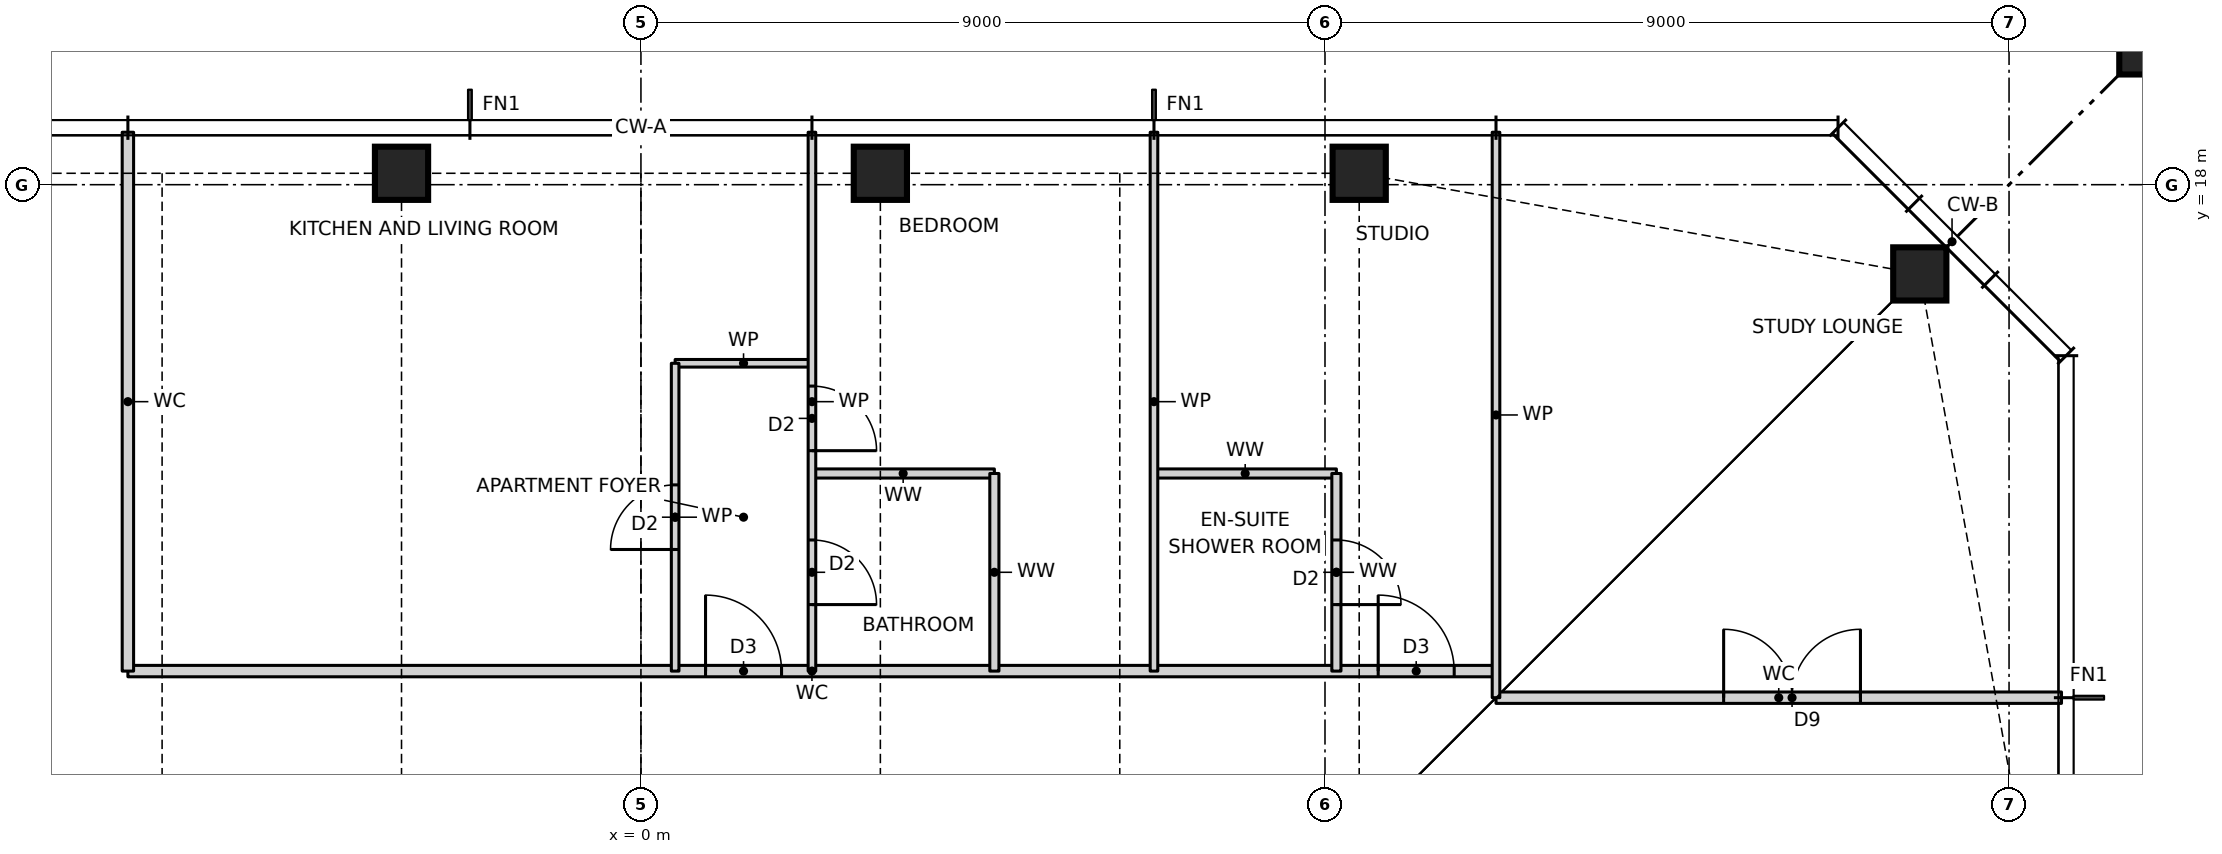
"""IFC4 building model, lengths in metres.
Left out: names, types, materials, properties, quantities, classifications, styles, units other than length and angle.
Written with IfcOpenShell. Run it as: python <this file> out.ifc"""

import sys

from ifc_helpers import new_model, si_unit, direction, frame, frame_2d, origin, origin_2d, place, context, subcontext, project, spatial, rectangle, hollow_rectangle, i_section, extrude, element, fill, save


model = new_model("IFC4")
c1 = context("Model", 3, precision=1e-05, world=origin(), true_north=direction((0.0, 1.0)))
c2 = subcontext(c1, "Body", "Model", "MODEL_VIEW")
j1 = project(units=[si_unit("LENGTHUNIT", "METRE"), si_unit("PLANEANGLEUNIT", "RADIAN")], contexts=[c1])
p1 = place(None, origin())
s1 = spatial("IfcSite", under=j1, at=p1, CompositionType="ELEMENT")
p2 = place(p1, origin())
s2 = spatial("IfcBuilding", under=s1, at=p2, CompositionType="ELEMENT")
p3 = place(p2, frame((0.0, 0.0, 184.5)))
s3 = spatial("IfcBuildingStorey", under=s2, at=p3, CompositionType="ELEMENT", Elevation=184.5)
for number, where, z_axis, x_axis in (
    (1, (16.826, 16.826, 0.0), (0.0, 0.0, 1.0), (1.0, 0.0, 0.0)),
    (2, (9.45, 18.15, 0.0), (0.0, 0.0, 1.0), (1.0, 0.0, 0.0)),
    (3, (3.15, 18.15, 0.0), (0.0, 0.0, 1.0), (1.0, 0.0, 0.0)),
    (4, (-3.15, 18.15, 0.0), (0.0, 0.0, 1.0), (1.0, 0.0, 0.0)),
):
    element("IfcColumn", number, at=place(p3, frame(where, z_axis=z_axis, x_axis=x_axis)), inside=s3, PredefinedType="COLUMN", context=c2, shape_type="SweptSolid", body=[
        extrude(hollow_rectangle(XDim=0.7, YDim=0.7, WallThickness=0.06, at=origin_2d()), origin(), (0.0, 0.0, 1.0), 3.5),
    ])
p4 = place(p3, frame((21.65, 21.65, 0.0), z_axis=(0.0, 0.0, 1.0), x_axis=(1.0, 0.0, 0.0)))
e5 = element("IfcColumn", 5, at=p4, inside=s3, PredefinedType="COLUMN", context=c2, shape_type="SweptSolid", body=[
    extrude(rectangle(XDim=4.4, YDim=4.4, at=origin_2d()), origin(), (0.0, 0.0, 1.0), 3.5),
    extrude(i_section(OverallWidth=0.478, OverallDepth=0.599, WebThickness=0.1, FlangeThickness=0.14, at=origin_2d()), origin(), (0.0, 0.0, 1.0), 3.5),
])
p5 = place(p3, frame((11.25, 11.25, 0.0), z_axis=(0.0, 0.0, 1.0), x_axis=(1.0, 0.0, 0.0)))
e6 = element("IfcWall", 6, at=p5, inside=s3, PredefinedType="PARTITIONING", context=c2, shape_type="SweptSolid", body=[
    extrude(rectangle(XDim=7.44, YDim=0.15, at=frame_2d((3.72, 0.0))), origin(), (0.0, 0.0, 1.0), 3.27),
])
p6 = place(p5, frame((2.995, 0.0, 0.0)))
e7 = element("IfcOpeningElement", 7, at=p6, cuts=e6, PredefinedType="OPENING", context=c2, shape_type="SweptSolid", body=[
    extrude(rectangle(XDim=1.8, YDim=2.1, at=frame_2d((0.9, 1.05))), frame((0.0, 0.085, 0.0), z_axis=(0.0, -1.0, 0.0), x_axis=(1.0, 0.0, 0.0)), (0.0, 0.0, 1.0), 0.17),
])
p7 = place(p3, frame((-6.75, 11.6, 0.0), z_axis=(0.0, 0.0, 1.0), x_axis=(1.0, 0.0, 0.0)))
e8 = element("IfcWall", 8, at=p7, inside=s3, PredefinedType="PARTITIONING", context=c2, shape_type="SweptSolid", body=[
    extrude(rectangle(XDim=18.0, YDim=0.15, at=frame_2d((9.0, 0.0))), origin(), (0.0, 0.0, 1.0), 3.27),
])
p8 = place(p7, frame((16.45, 0.0, 0.0)))
e9 = element("IfcOpeningElement", 9, at=p8, cuts=e8, PredefinedType="OPENING", context=c2, shape_type="SweptSolid", body=[
    extrude(rectangle(XDim=1.0, YDim=2.1, at=frame_2d((0.5, 1.05))), frame((0.0, 0.085, 0.0), z_axis=(0.0, -1.0, 0.0), x_axis=(1.0, 0.0, 0.0)), (0.0, 0.0, 1.0), 0.17),
])
p9 = place(p7, frame((7.6, 0.0, 0.0)))
e10 = element("IfcOpeningElement", 10, at=p9, cuts=e8, PredefinedType="OPENING", context=c2, shape_type="SweptSolid", body=[
    extrude(rectangle(XDim=1.0, YDim=2.1, at=frame_2d((0.5, 1.05))), frame((0.0, 0.085, 0.0), z_axis=(0.0, -1.0, 0.0), x_axis=(1.0, 0.0, 0.0)), (0.0, 0.0, 1.0), 0.17),
])
for number, where, z_axis, x_axis in (
    (11, (2.25, 14.2, 0.0), (0.0, 0.0, 1.0), (1.0, 0.0, 0.0)),
    (12, (6.75, 14.2, 0.0), (0.0, 0.0, 1.0), (1.0, 0.0, 0.0)),
):
    element("IfcWall", number, at=place(p3, frame(where, z_axis=z_axis, x_axis=x_axis)), inside=s3, PredefinedType="PARTITIONING", context=c2, shape_type="SweptSolid", body=[
        extrude(rectangle(XDim=2.4, YDim=0.12, at=frame_2d((1.2, 0.0))), origin(), (0.0, 0.0, 1.0), 3.27),
    ])
p10 = place(p3, frame((0.45, 15.65, 0.0), z_axis=(0.0, 0.0, 1.0), x_axis=(1.0, 0.0, 0.0)))
e13 = element("IfcWall", 13, at=p10, inside=s3, PredefinedType="PARTITIONING", context=c2, shape_type="SweptSolid", body=[
    extrude(rectangle(XDim=1.8, YDim=0.1, at=frame_2d((0.9, 0.0))), origin(), (0.0, 0.0, 1.0), 3.27),
])
p11 = place(p3, frame((11.25, 11.25, 0.0), z_axis=(0.0, 0.0, 1.0), x_axis=(0.0, 1.0, 0.0)))
e14 = element("IfcWall", 14, at=p11, inside=s3, PredefinedType="PARTITIONING", context=c2, shape_type="SweptSolid", body=[
    extrude(rectangle(XDim=7.44, YDim=0.1, at=frame_2d((3.72, 0.0))), origin(), (0.0, 0.0, 1.0), 3.27),
])
p12 = place(p3, frame((9.15, 11.6, 0.0), z_axis=(0.0, 0.0, 1.0), x_axis=(0.0, 1.0, 0.0)))
e15 = element("IfcWall", 15, at=p12, inside=s3, PredefinedType="PARTITIONING", context=c2, shape_type="SweptSolid", body=[
    extrude(rectangle(XDim=2.6, YDim=0.12, at=frame_2d((1.3, 0.0))), origin(), (0.0, 0.0, 1.0), 3.27),
])
p13 = place(p12, frame((0.875, 0.0, 0.0)))
e16 = element("IfcOpeningElement", 16, at=p13, cuts=e15, PredefinedType="OPENING", context=c2, shape_type="SweptSolid", body=[
    extrude(rectangle(XDim=0.85, YDim=2.1, at=frame_2d((0.425, 1.05))), frame((0.0, 0.07, 0.0), z_axis=(0.0, -1.0, 0.0), x_axis=(1.0, 0.0, 0.0)), (0.0, 0.0, 1.0), 0.14),
])
p14 = place(p3, frame((6.75, 11.6, 0.0), z_axis=(0.0, 0.0, 1.0), x_axis=(0.0, 1.0, 0.0)))
e17 = element("IfcWall", 17, at=p14, inside=s3, PredefinedType="PARTITIONING", context=c2, shape_type="SweptSolid", body=[
    extrude(rectangle(XDim=7.09, YDim=0.1, at=frame_2d((3.545, 0.0))), origin(), (0.0, 0.0, 1.0), 3.27),
])
p15 = place(p3, frame((4.65, 11.6, 0.0), z_axis=(0.0, 0.0, 1.0), x_axis=(0.0, 1.0, 0.0)))
e18 = element("IfcWall", 18, at=p15, inside=s3, PredefinedType="PARTITIONING", context=c2, shape_type="SweptSolid", body=[
    extrude(rectangle(XDim=2.6, YDim=0.12, at=frame_2d((1.3, 0.0))), origin(), (0.0, 0.0, 1.0), 3.27),
])
p16 = place(p3, frame((2.25, 11.6, 0.0), z_axis=(0.0, 0.0, 1.0), x_axis=(0.0, 1.0, 0.0)))
e19 = element("IfcWall", 19, at=p16, inside=s3, PredefinedType="PARTITIONING", context=c2, shape_type="SweptSolid", body=[
    extrude(rectangle(XDim=7.09, YDim=0.1, at=frame_2d((3.545, 0.0))), origin(), (0.0, 0.0, 1.0), 3.27),
])
p17 = place(p16, frame((2.9, 0.0, 0.0)))
e20 = element("IfcOpeningElement", 20, at=p17, cuts=e19, PredefinedType="OPENING", context=c2, shape_type="SweptSolid", body=[
    extrude(rectangle(XDim=0.85, YDim=2.1, at=frame_2d((0.425, 1.05))), frame((0.0, 0.06, 0.0), z_axis=(0.0, -1.0, 0.0), x_axis=(1.0, 0.0, 0.0)), (0.0, 0.0, 1.0), 0.12),
])
p18 = place(p16, frame((0.875, 0.0, 0.0)))
e21 = element("IfcOpeningElement", 21, at=p18, cuts=e19, PredefinedType="OPENING", context=c2, shape_type="SweptSolid", body=[
    extrude(rectangle(XDim=0.85, YDim=2.1, at=frame_2d((0.425, 1.05))), frame((0.0, 0.06, 0.0), z_axis=(0.0, -1.0, 0.0), x_axis=(1.0, 0.0, 0.0)), (0.0, 0.0, 1.0), 0.12),
])
p19 = place(p3, frame((0.45, 11.6, 0.0), z_axis=(0.0, 0.0, 1.0), x_axis=(0.0, 1.0, 0.0)))
e22 = element("IfcWall", 22, at=p19, inside=s3, PredefinedType="PARTITIONING", context=c2, shape_type="SweptSolid", body=[
    extrude(rectangle(XDim=4.05, YDim=0.1, at=frame_2d((2.025, 0.0))), origin(), (0.0, 0.0, 1.0), 3.27),
])
p20 = place(p19, frame((1.6, 0.0, 0.0)))
e23 = element("IfcOpeningElement", 23, at=p20, cuts=e22, PredefinedType="OPENING", context=c2, shape_type="SweptSolid", body=[
    extrude(rectangle(XDim=0.85, YDim=2.1, at=frame_2d((0.425, 1.05))), frame((0.0, 0.06, 0.0), z_axis=(0.0, -1.0, 0.0), x_axis=(1.0, 0.0, 0.0)), (0.0, 0.0, 1.0), 0.12),
])
p21 = place(p3, frame((-6.75, 11.6, 0.0), z_axis=(0.0, 0.0, 1.0), x_axis=(0.0, 1.0, 0.0)))
e24 = element("IfcWall", 24, at=p21, inside=s3, PredefinedType="PARTITIONING", context=c2, shape_type="SweptSolid", body=[
    extrude(rectangle(XDim=7.09, YDim=0.15, at=frame_2d((3.545, 0.0))), origin(), (0.0, 0.0, 1.0), 3.27),
])
p22 = place(p8, origin())
e25 = element("IfcDoor", 25, at=p22, inside=s3, OperationType="SINGLE_SWING_LEFT", PredefinedType="DOOR", context=c2, shape_type="SweptSolid", body=[
    extrude(rectangle(XDim=1.0, YDim=2.1, at=frame_2d((0.5, 1.05))), frame((0.0, 0.025, 0.0), z_axis=(0.0, -1.0, 0.0), x_axis=(1.0, 0.0, 0.0)), (0.0, 0.0, 1.0), 0.05),
])
fill(e9, e25)
p23 = place(p13, frame((0.85, 0.0, 0.0), z_axis=(0.0, 0.0, 1.0), x_axis=(-1.0, 0.0, 0.0)))
e26 = element("IfcDoor", 26, at=p23, inside=s3, OperationType="SINGLE_SWING_RIGHT", PredefinedType="DOOR", context=c2, shape_type="SweptSolid", body=[
    extrude(rectangle(XDim=0.85, YDim=2.1, at=frame_2d((0.425, 1.05))), frame((0.0, 0.025, 0.0), z_axis=(0.0, -1.0, 0.0), x_axis=(1.0, 0.0, 0.0)), (0.0, 0.0, 1.0), 0.05),
])
fill(e16, e26)
p24 = place(p9, origin())
e27 = element("IfcDoor", 27, at=p24, inside=s3, OperationType="SINGLE_SWING_LEFT", PredefinedType="DOOR", context=c2, shape_type="SweptSolid", body=[
    extrude(rectangle(XDim=1.0, YDim=2.1, at=frame_2d((0.5, 1.05))), frame((0.0, 0.025, 0.0), z_axis=(0.0, -1.0, 0.0), x_axis=(1.0, 0.0, 0.0)), (0.0, 0.0, 1.0), 0.05),
])
fill(e10, e27)
p25 = place(p20, origin())
e28 = element("IfcDoor", 28, at=p25, inside=s3, OperationType="SINGLE_SWING_LEFT", PredefinedType="DOOR", context=c2, shape_type="SweptSolid", body=[
    extrude(rectangle(XDim=0.85, YDim=2.1, at=frame_2d((0.425, 1.05))), frame((0.0, 0.025, 0.0), z_axis=(0.0, -1.0, 0.0), x_axis=(1.0, 0.0, 0.0)), (0.0, 0.0, 1.0), 0.05),
])
fill(e23, e28)
p26 = place(p17, frame((0.85, 0.0, 0.0), z_axis=(0.0, 0.0, 1.0), x_axis=(-1.0, 0.0, 0.0)))
e29 = element("IfcDoor", 29, at=p26, inside=s3, OperationType="SINGLE_SWING_RIGHT", PredefinedType="DOOR", context=c2, shape_type="SweptSolid", body=[
    extrude(rectangle(XDim=0.85, YDim=2.1, at=frame_2d((0.425, 1.05))), frame((0.0, 0.025, 0.0), z_axis=(0.0, -1.0, 0.0), x_axis=(1.0, 0.0, 0.0)), (0.0, 0.0, 1.0), 0.05),
])
fill(e20, e29)
p27 = place(p18, frame((0.85, 0.0, 0.0), z_axis=(0.0, 0.0, 1.0), x_axis=(-1.0, 0.0, 0.0)))
e30 = element("IfcDoor", 30, at=p27, inside=s3, OperationType="SINGLE_SWING_RIGHT", PredefinedType="DOOR", context=c2, shape_type="SweptSolid", body=[
    extrude(rectangle(XDim=0.85, YDim=2.1, at=frame_2d((0.425, 1.05))), frame((0.0, 0.025, 0.0), z_axis=(0.0, -1.0, 0.0), x_axis=(1.0, 0.0, 0.0)), (0.0, 0.0, 1.0), 0.05),
])
fill(e21, e30)
p28 = place(p6, origin())
e31 = element("IfcDoor", 31, at=p28, inside=s3, OperationType="DOUBLE_DOOR_SINGLE_SWING", PredefinedType="DOOR", context=c2, shape_type="SweptSolid", body=[
    extrude(rectangle(XDim=1.8, YDim=2.1, at=frame_2d((0.9, 1.05))), frame((0.0, 0.025, 0.0), z_axis=(0.0, -1.0, 0.0), x_axis=(1.0, 0.0, 0.0)), (0.0, 0.0, 1.0), 0.05),
])
fill(e7, e31)
save(model, sys.argv[1])
